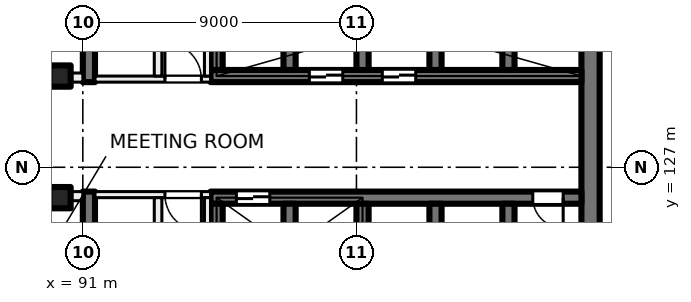
"""IFC4 building model, lengths in metres.
Left out: names, types, materials, properties, quantities, classifications, styles, units other than length and angle.
Written with IfcOpenShell. Run it as: python <this file> out.ifc"""

import sys

from ifc_helpers import new_model, si_unit, direction, frame, frame_2d, origin, origin_2d, place, context, subcontext, project, spatial, rectangle, extrude, element, fill, save


model = new_model("IFC4")
c1 = context("Model", 3, precision=1e-05, world=origin(), true_north=direction((0.0, 1.0)))
c2 = subcontext(c1, "Body", "Model", "MODEL_VIEW")
j1 = project(units=[si_unit("LENGTHUNIT", "METRE"), si_unit("PLANEANGLEUNIT", "RADIAN")], contexts=[c1])
p1 = place(None, origin())
s1 = spatial("IfcSite", under=j1, at=p1, CompositionType="ELEMENT")
p2 = place(p1, origin())
s2 = spatial("IfcBuilding", under=s1, at=p2, CompositionType="ELEMENT")
p3 = place(p2, frame((0.0, 0.0, 51.5)))
s3 = spatial("IfcBuildingStorey", under=s2, at=p3, CompositionType="ELEMENT", Elevation=51.5)
for number, where, z_axis, x_axis in (
    (1, (90.25, 130.0, 0.0), (0.0, 0.0, 1.0), (1.0, 0.0, 0.0)),
    (2, (90.25, 126.0, 0.0), (0.0, 0.0, 1.0), (1.0, 0.0, 0.0)),
):
    element("IfcColumn", number, at=place(p3, frame(where, z_axis=z_axis, x_axis=x_axis)), inside=s3, PredefinedType="COLUMN", context=c2, shape_type="SweptSolid", body=[
        extrude(rectangle(XDim=0.7, YDim=0.7, at=origin_2d()), origin(), (0.0, 0.0, 1.0), 4.0),
    ])
p4 = place(p3, frame((107.7, 135.2, 0.0), z_axis=(0.0, 0.0, 1.0), x_axis=(0.0, -1.0, 0.0)))
e3 = element("IfcWall", 3, at=p4, inside=s3, PredefinedType="SHEAR", context=c2, shape_type="SweptSolid", body=[
    extrude(rectangle(XDim=14.4, YDim=0.6, at=frame_2d((7.2, 0.0))), origin(), (0.0, 0.0, 1.0), 4.0),
])
p5 = place(p3, frame((107.4, 130.0, 0.0), z_axis=(0.0, 0.0, 1.0), x_axis=(-1.0, 0.0, 0.0)))
e4 = element("IfcWall", 4, at=p5, inside=s3, PredefinedType="SHEAR", context=c2, shape_type="SweptSolid", body=[
    extrude(rectangle(XDim=12.2, YDim=0.4, at=frame_2d((6.1, 0.0))), origin(), (0.0, 0.0, 1.0), 4.0),
])
p6 = place(p5, frame((5.45, 0.0, 0.0)))
e5 = element("IfcOpeningElement", 5, at=p6, cuts=e4, PredefinedType="OPENING", context=c2, shape_type="SweptSolid", body=[
    extrude(rectangle(XDim=1.1, YDim=2.1, at=frame_2d((0.55, 1.05))), frame((0.0, 0.21, 0.0), z_axis=(0.0, -1.0, 0.0), x_axis=(1.0, 0.0, 0.0)), (0.0, 0.0, 1.0), 0.42),
])
p7 = place(p5, frame((7.85, 0.0, 0.0)))
e6 = element("IfcOpeningElement", 6, at=p7, cuts=e4, PredefinedType="OPENING", context=c2, shape_type="SweptSolid", body=[
    extrude(rectangle(XDim=1.1, YDim=2.1, at=frame_2d((0.55, 1.05))), frame((0.0, 0.21, 0.0), z_axis=(0.0, -1.0, 0.0), x_axis=(1.0, 0.0, 0.0)), (0.0, 0.0, 1.0), 0.42),
])
for number, where, z_axis, x_axis in (
    (7, (105.0, 133.2, 0.0), (0.0, 0.0, 1.0), (0.0, -1.0, 0.0)),
    (8, (102.6, 133.2, 0.0), (0.0, 0.0, 1.0), (0.0, -1.0, 0.0)),
    (9, (100.2, 133.2, 0.0), (0.0, 0.0, 1.0), (0.0, -1.0, 0.0)),
    (10, (97.8, 133.2, 0.0), (0.0, 0.0, 1.0), (0.0, -1.0, 0.0)),
    (11, (95.4, 133.2, 0.0), (0.0, 0.0, 1.0), (0.0, -1.0, 0.0)),
):
    element("IfcWall", number, at=place(p3, frame(where, z_axis=z_axis, x_axis=x_axis)), inside=s3, PredefinedType="SHEAR", context=c2, shape_type="SweptSolid", body=[
        extrude(rectangle(XDim=3.0, YDim=0.4, at=frame_2d((1.5, 0.0))), origin(), (0.0, 0.0, 1.0), 4.0),
    ])
p8 = place(p3, frame((107.4, 126.0, 0.0), z_axis=(0.0, 0.0, 1.0), x_axis=(-1.0, 0.0, 0.0)))
e12 = element("IfcWall", 12, at=p8, inside=s3, PredefinedType="SHEAR", context=c2, shape_type="SweptSolid", body=[
    extrude(rectangle(XDim=12.2, YDim=0.4, at=frame_2d((6.1, 0.0))), origin(), (0.0, 0.0, 1.0), 4.0),
])
p9 = place(p8, frame((10.25, 0.0, 0.0)))
e13 = element("IfcOpeningElement", 13, at=p9, cuts=e12, PredefinedType="OPENING", context=c2, shape_type="SweptSolid", body=[
    extrude(rectangle(XDim=1.1, YDim=2.1, at=frame_2d((0.55, 1.05))), frame((0.0, 0.21, 0.0), z_axis=(0.0, -1.0, 0.0), x_axis=(1.0, 0.0, 0.0)), (0.0, 0.0, 1.0), 0.42),
])
p10 = place(p8, frame((0.6, 0.0, 0.0)))
e14 = element("IfcOpeningElement", 14, at=p10, cuts=e12, PredefinedType="OPENING", context=c2, shape_type="SweptSolid", body=[
    extrude(rectangle(XDim=1.0, YDim=2.1, at=frame_2d((0.5, 1.05))), frame((0.0, 0.21, 0.0), z_axis=(0.0, -1.0, 0.0), x_axis=(1.0, 0.0, 0.0)), (0.0, 0.0, 1.0), 0.42),
])
for number, where, z_axis, x_axis in (
    (15, (105.0, 125.8, 0.0), (0.0, 0.0, 1.0), (0.0, -1.0, 0.0)),
    (16, (102.6, 125.8, 0.0), (0.0, 0.0, 1.0), (0.0, -1.0, 0.0)),
    (17, (100.2, 125.8, 0.0), (0.0, 0.0, 1.0), (0.0, -1.0, 0.0)),
    (18, (97.8, 125.8, 0.0), (0.0, 0.0, 1.0), (0.0, -1.0, 0.0)),
    (19, (95.4, 125.8, 0.0), (0.0, 0.0, 1.0), (0.0, -1.0, 0.0)),
):
    element("IfcWall", number, at=place(p3, frame(where, z_axis=z_axis, x_axis=x_axis)), inside=s3, PredefinedType="SHEAR", context=c2, shape_type="SweptSolid", body=[
        extrude(rectangle(XDim=3.0, YDim=0.4, at=frame_2d((1.5, 0.0))), origin(), (0.0, 0.0, 1.0), 4.0),
    ])
for number, where, z_axis, x_axis in (
    (20, (91.2, 138.4, 0.0), (0.0, 0.0, 1.0), (0.0, -1.0, 0.0)),
    (21, (91.2, 126.2, 0.0), (0.0, 0.0, 1.0), (0.0, -1.0, 0.0)),
):
    element("IfcWall", number, at=place(p3, frame(where, z_axis=z_axis, x_axis=x_axis)), inside=s3, PredefinedType="SHEAR", context=c2, shape_type="SweptSolid", body=[
        extrude(rectangle(XDim=8.6, YDim=0.4, at=frame_2d((4.3, 0.0))), origin(), (0.0, 0.0, 1.0), 4.0),
    ])
p11 = place(p3, frame((95.2, 126.1, 0.0), z_axis=(0.0, 0.0, 1.0), x_axis=(-1.0, 0.0, 0.0)))
e22 = element("IfcWall", 22, at=p11, inside=s3, PredefinedType="PARTITIONING", context=c2, shape_type="SweptSolid", body=[
    extrude(rectangle(XDim=3.8, YDim=0.2, at=frame_2d((1.9, 0.0))), origin(), (0.0, 0.0, 1.0), 3.625),
])
p12 = place(p11, frame((0.3, 0.0, 0.0)))
e23 = element("IfcOpeningElement", 23, at=p12, cuts=e22, PredefinedType="OPENING", context=c2, shape_type="SweptSolid", body=[
    extrude(rectangle(XDim=1.2, YDim=2.1, at=frame_2d((0.6, 1.05))), frame((0.0, 0.11, 0.0), z_axis=(0.0, -1.0, 0.0), x_axis=(1.0, 0.0, 0.0)), (0.0, 0.0, 1.0), 0.22),
])
p13 = place(p3, frame((95.1, 117.6, 0.0), z_axis=(0.0, 0.0, 1.0), x_axis=(0.0, 1.0, 0.0)))
e24 = element("IfcWall", 24, at=p13, inside=s3, PredefinedType="PARTITIONING", context=c2, shape_type="SweptSolid", body=[
    extrude(rectangle(XDim=8.4, YDim=0.2, at=frame_2d((4.2, 0.0))), origin(), (0.0, 0.0, 1.0), 3.625),
])
p14 = place(p13, frame((1.65, 0.0, 0.0)))
e25 = element("IfcOpeningElement", 25, at=p14, cuts=e24, PredefinedType="OPENING", context=c2, shape_type="SweptSolid", body=[
    extrude(rectangle(XDim=1.5, YDim=2.1, at=frame_2d((0.75, 1.05))), frame((0.0, 0.11, 0.0), z_axis=(0.0, -1.0, 0.0), x_axis=(1.0, 0.0, 0.0)), (0.0, 0.0, 1.0), 0.22),
])
p15 = place(p3, frame((93.475, 117.6, 0.0), z_axis=(0.0, 0.0, 1.0), x_axis=(0.0, 1.0, 0.0)))
e26 = element("IfcWall", 26, at=p15, inside=s3, PredefinedType="PARTITIONING", context=c2, shape_type="SweptSolid", body=[
    extrude(rectangle(XDim=8.4, YDim=0.25, at=frame_2d((4.2, 0.0))), origin(), (0.0, 0.0, 1.0), 3.625),
])
p16 = place(p15, frame((6.625, 0.0, 0.0)))
e27 = element("IfcOpeningElement", 27, at=p16, cuts=e26, PredefinedType="OPENING", context=c2, shape_type="SweptSolid", body=[
    extrude(rectangle(XDim=0.8, YDim=2.1, at=frame_2d((0.4, 1.05))), frame((0.0, 0.135, 0.0), z_axis=(0.0, -1.0, 0.0), x_axis=(1.0, 0.0, 0.0)), (0.0, 0.0, 1.0), 0.27),
])
p17 = place(p15, frame((2.375, 0.0, 0.0)))
e28 = element("IfcOpeningElement", 28, at=p17, cuts=e26, PredefinedType="OPENING", context=c2, shape_type="SweptSolid", body=[
    extrude(rectangle(XDim=0.8, YDim=2.1, at=frame_2d((0.4, 1.05))), frame((0.0, 0.135, 0.0), z_axis=(0.0, -1.0, 0.0), x_axis=(1.0, 0.0, 0.0)), (0.0, 0.0, 1.0), 0.27),
])
p18 = place(p3, frame((91.4, 129.9, 0.0), z_axis=(0.0, 0.0, 1.0), x_axis=(1.0, 0.0, 0.0)))
e29 = element("IfcWall", 29, at=p18, inside=s3, PredefinedType="PARTITIONING", context=c2, shape_type="SweptSolid", body=[
    extrude(rectangle(XDim=3.8, YDim=0.2, at=frame_2d((1.9, 0.0))), origin(), (0.0, 0.0, 1.0), 3.625),
])
p19 = place(p18, frame((2.3, 0.0, 0.0)))
e30 = element("IfcOpeningElement", 30, at=p19, cuts=e29, PredefinedType="OPENING", context=c2, shape_type="SweptSolid", body=[
    extrude(rectangle(XDim=1.2, YDim=2.1, at=frame_2d((0.6, 1.05))), frame((0.0, 0.11, 0.0), z_axis=(0.0, -1.0, 0.0), x_axis=(1.0, 0.0, 0.0)), (0.0, 0.0, 1.0), 0.22),
])
p20 = place(p3, frame((95.1, 130.0, 0.0), z_axis=(0.0, 0.0, 1.0), x_axis=(0.0, 1.0, 0.0)))
e31 = element("IfcWall", 31, at=p20, inside=s3, PredefinedType="PARTITIONING", context=c2, shape_type="SweptSolid", body=[
    extrude(rectangle(XDim=8.4, YDim=0.2, at=frame_2d((4.2, 0.0))), origin(), (0.0, 0.0, 1.0), 3.625),
])
p21 = place(p20, frame((5.25, 0.0, 0.0)))
e32 = element("IfcOpeningElement", 32, at=p21, cuts=e31, PredefinedType="OPENING", context=c2, shape_type="SweptSolid", body=[
    extrude(rectangle(XDim=1.5, YDim=2.1, at=frame_2d((0.75, 1.05))), frame((0.0, 0.11, 0.0), z_axis=(0.0, -1.0, 0.0), x_axis=(1.0, 0.0, 0.0)), (0.0, 0.0, 1.0), 0.22),
])
p22 = place(p3, frame((93.475, 130.0, 0.0), z_axis=(0.0, 0.0, 1.0), x_axis=(0.0, 1.0, 0.0)))
e33 = element("IfcWall", 33, at=p22, inside=s3, PredefinedType="PARTITIONING", context=c2, shape_type="SweptSolid", body=[
    extrude(rectangle(XDim=8.4, YDim=0.25, at=frame_2d((4.2, 0.0))), origin(), (0.0, 0.0, 1.0), 3.625),
])
p23 = place(p22, frame((0.875, 0.0, 0.0)))
e34 = element("IfcOpeningElement", 34, at=p23, cuts=e33, PredefinedType="OPENING", context=c2, shape_type="SweptSolid", body=[
    extrude(rectangle(XDim=1.0, YDim=2.1, at=frame_2d((0.5, 1.05))), frame((0.0, 0.135, 0.0), z_axis=(0.0, -1.0, 0.0), x_axis=(1.0, 0.0, 0.0)), (0.0, 0.0, 1.0), 0.27),
])
p24 = place(p22, frame((5.225, 0.0, 0.0)))
e35 = element("IfcOpeningElement", 35, at=p24, cuts=e33, PredefinedType="OPENING", context=c2, shape_type="SweptSolid", body=[
    extrude(rectangle(XDim=0.8, YDim=2.1, at=frame_2d((0.4, 1.05))), frame((0.0, 0.135, 0.0), z_axis=(0.0, -1.0, 0.0), x_axis=(1.0, 0.0, 0.0)), (0.0, 0.0, 1.0), 0.27),
])
p25 = place(p3, frame((72.5, 129.95, 0.0), z_axis=(0.0, 0.0, 1.0), x_axis=(1.0, 0.0, 0.0)))
e36 = element("IfcWall", 36, at=p25, inside=s3, PredefinedType="PARTITIONING", context=c2, shape_type="SweptSolid", body=[
    extrude(rectangle(XDim=18.5, YDim=0.3, at=frame_2d((9.25, 0.0))), origin(), (0.0, 0.0, 1.0), 3.625),
])
p26 = place(p25, frame((2.275, 0.0, 0.0)))
e37 = element("IfcOpeningElement", 37, at=p26, cuts=e36, PredefinedType="OPENING", context=c2, shape_type="SweptSolid", body=[
    extrude(rectangle(XDim=1.2, YDim=2.1, at=frame_2d((0.6, 1.05))), frame((0.0, 0.16, 0.0), z_axis=(0.0, -1.0, 0.0), x_axis=(1.0, 0.0, 0.0)), (0.0, 0.0, 1.0), 0.32),
])
p27 = place(p25, frame((11.225, 0.0, 0.0)))
e38 = element("IfcOpeningElement", 38, at=p27, cuts=e36, PredefinedType="OPENING", context=c2, shape_type="SweptSolid", body=[
    extrude(rectangle(XDim=1.8, YDim=2.1, at=frame_2d((0.9, 1.05))), frame((0.0, 0.16, 0.0), z_axis=(0.0, -1.0, 0.0), x_axis=(1.0, 0.0, 0.0)), (0.0, 0.0, 1.0), 0.32),
])
p28 = place(p3, frame((91.0, 126.05, 0.0), z_axis=(0.0, 0.0, 1.0), x_axis=(-1.0, 0.0, 0.0)))
e39 = element("IfcWall", 39, at=p28, inside=s3, PredefinedType="PARTITIONING", context=c2, shape_type="SweptSolid", body=[
    extrude(rectangle(XDim=43.785, YDim=0.3, at=frame_2d((21.893, 0.0))), origin(), (0.0, 0.0, 1.0), 3.625),
])
p29 = place(p28, frame((2.025, 0.0, 0.0)))
e40 = element("IfcOpeningElement", 40, at=p29, cuts=e39, PredefinedType="OPENING", context=c2, shape_type="SweptSolid", body=[
    extrude(rectangle(XDim=1.2, YDim=2.1, at=frame_2d((0.6, 1.05))), frame((0.0, 0.16, 0.0), z_axis=(0.0, -1.0, 0.0), x_axis=(1.0, 0.0, 0.0)), (0.0, 0.0, 1.0), 0.32),
])
p30 = place(p28, frame((6.9, 0.0, 0.0)))
e41 = element("IfcOpeningElement", 41, at=p30, cuts=e39, PredefinedType="OPENING", context=c2, shape_type="SweptSolid", body=[
    extrude(rectangle(XDim=1.2, YDim=2.1, at=frame_2d((0.6, 1.05))), frame((0.0, 0.16, 0.0), z_axis=(0.0, -1.0, 0.0), x_axis=(1.0, 0.0, 0.0)), (0.0, 0.0, 1.0), 0.32),
])
p31 = place(p28, frame((15.6, 0.0, 0.0)))
e42 = element("IfcOpeningElement", 42, at=p31, cuts=e39, PredefinedType="OPENING", context=c2, shape_type="SweptSolid", body=[
    extrude(rectangle(XDim=1.8, YDim=2.1, at=frame_2d((0.9, 1.05))), frame((0.0, 0.16, 0.0), z_axis=(0.0, -1.0, 0.0), x_axis=(1.0, 0.0, 0.0)), (0.0, 0.0, 1.0), 0.32),
])
p32 = place(p28, frame((39.296, 0.0, 0.0)))
e43 = element("IfcOpeningElement", 43, at=p32, cuts=e39, PredefinedType="OPENING", context=c2, shape_type="SweptSolid", body=[
    extrude(rectangle(XDim=1.8, YDim=2.1, at=frame_2d((0.9, 1.05))), frame((0.0, 0.16, 0.0), z_axis=(0.0, -1.0, 0.0), x_axis=(1.0, 0.0, 0.0)), (0.0, 0.0, 1.0), 0.32),
])
p33 = place(p9, origin())
e44 = element("IfcDoor", 44, at=p33, inside=s3, OperationType="DOUBLE_DOOR_SLIDING", PredefinedType="DOOR", context=c2, shape_type="SweptSolid", body=[
    extrude(rectangle(XDim=1.1, YDim=2.1, at=frame_2d((0.55, 1.05))), frame((0.0, 0.025, 0.0), z_axis=(0.0, -1.0, 0.0), x_axis=(1.0, 0.0, 0.0)), (0.0, 0.0, 1.0), 0.05),
])
fill(e13, e44)
p34 = place(p6, origin())
e45 = element("IfcDoor", 45, at=p34, inside=s3, OperationType="DOUBLE_DOOR_SLIDING", PredefinedType="DOOR", context=c2, shape_type="SweptSolid", body=[
    extrude(rectangle(XDim=1.1, YDim=2.1, at=frame_2d((0.55, 1.05))), frame((0.0, 0.025, 0.0), z_axis=(0.0, -1.0, 0.0), x_axis=(1.0, 0.0, 0.0)), (0.0, 0.0, 1.0), 0.05),
])
fill(e5, e45)
p35 = place(p7, origin())
e46 = element("IfcDoor", 46, at=p35, inside=s3, OperationType="DOUBLE_DOOR_SLIDING", PredefinedType="DOOR", context=c2, shape_type="SweptSolid", body=[
    extrude(rectangle(XDim=1.1, YDim=2.1, at=frame_2d((0.55, 1.05))), frame((0.0, 0.025, 0.0), z_axis=(0.0, -1.0, 0.0), x_axis=(1.0, 0.0, 0.0)), (0.0, 0.0, 1.0), 0.05),
])
fill(e6, e46)
p36 = place(p10, origin())
e47 = element("IfcDoor", 47, at=p36, inside=s3, OperationType="SINGLE_SWING_LEFT", PredefinedType="DOOR", context=c2, shape_type="SweptSolid", body=[
    extrude(rectangle(XDim=1.0, YDim=2.1, at=frame_2d((0.5, 1.05))), frame((0.0, 0.025, 0.0), z_axis=(0.0, -1.0, 0.0), x_axis=(1.0, 0.0, 0.0)), (0.0, 0.0, 1.0), 0.05),
])
fill(e14, e47)
p37 = place(p12, origin())
e48 = element("IfcDoor", 48, at=p37, inside=s3, OperationType="DOUBLE_DOOR_SINGLE_SWING", PredefinedType="DOOR", context=c2, shape_type="SweptSolid", body=[
    extrude(rectangle(XDim=1.2, YDim=2.1, at=frame_2d((0.6, 1.05))), frame((0.0, 0.025, 0.0), z_axis=(0.0, -1.0, 0.0), x_axis=(1.0, 0.0, 0.0)), (0.0, 0.0, 1.0), 0.05),
])
fill(e23, e48)
p38 = place(p19, origin())
e49 = element("IfcDoor", 49, at=p38, inside=s3, OperationType="DOUBLE_DOOR_SINGLE_SWING", PredefinedType="DOOR", context=c2, shape_type="SweptSolid", body=[
    extrude(rectangle(XDim=1.2, YDim=2.1, at=frame_2d((0.6, 1.05))), frame((0.0, 0.025, 0.0), z_axis=(0.0, -1.0, 0.0), x_axis=(1.0, 0.0, 0.0)), (0.0, 0.0, 1.0), 0.05),
])
fill(e30, e49)
save(model, sys.argv[1])
